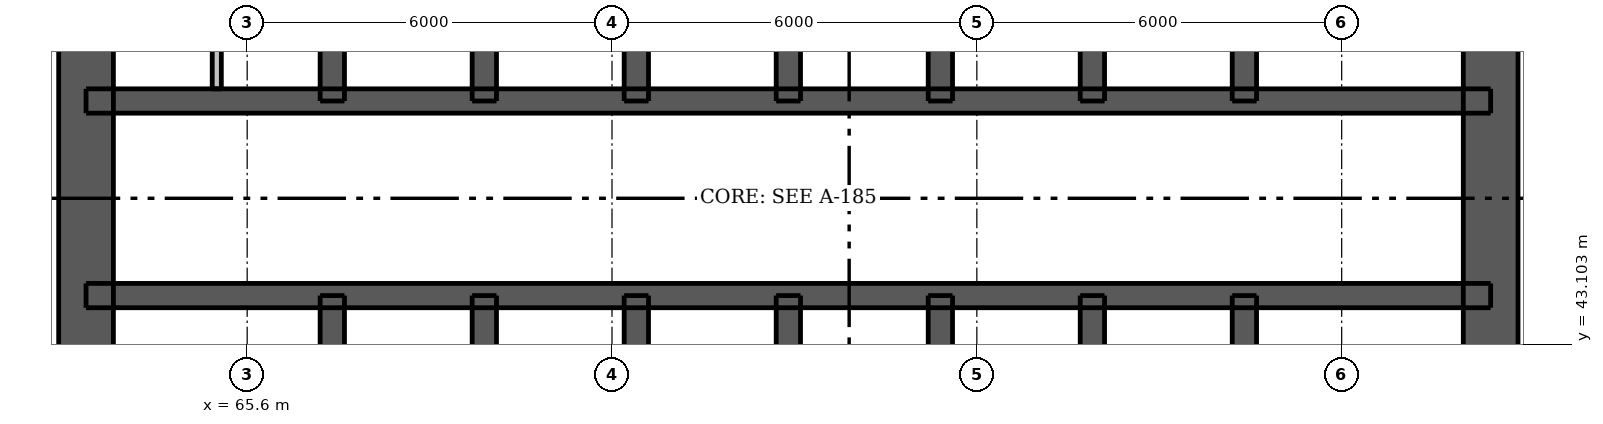
"""IFC4 building model, lengths in metres.
Left out: names, types, materials, properties, quantities, classifications, styles, units other than length and angle.
Written with IfcOpenShell. Run it as: python <this file> out.ifc"""

import sys

from ifc_helpers import new_model, si_unit, direction, frame, frame_2d, origin, place, context, subcontext, project, spatial, rectangle, extrude, element, fill, save


model = new_model("IFC4")
c1 = context("Model", 3, precision=1e-05, world=origin(), true_north=direction((0.0, 1.0)))
c2 = subcontext(c1, "Body", "Model", "MODEL_VIEW")
j1 = project(units=[si_unit("LENGTHUNIT", "METRE"), si_unit("PLANEANGLEUNIT", "RADIAN")], contexts=[c1])
p1 = place(None, origin())
s1 = spatial("IfcSite", under=j1, at=p1, CompositionType="ELEMENT")
p2 = place(p1, origin())
s2 = spatial("IfcBuilding", under=s1, at=p2, CompositionType="ELEMENT")
p3 = place(p2, frame((0.0, 0.0, 26.8)))
s3 = spatial("IfcBuildingStorey", under=s2, at=p3, CompositionType="ELEMENT", Elevation=26.8)
p4 = place(p3, frame((62.95, 33.5, 0.0), z_axis=(0.0, 0.0, 1.0), x_axis=(0.0, 1.0, 0.0)))
e1 = element("IfcWall", 1, at=p4, inside=s3, PredefinedType="SHEAR", context=c2, shape_type="SweptSolid", body=[
    extrude(rectangle(XDim=24.0, YDim=0.9, at=frame_2d((12.0, 0.0))), origin(), (0.0, 0.0, 1.0), 3.05),
])
p5 = place(p4, frame((11.2, 0.0, 0.0)))
e2 = element("IfcOpeningElement", 2, at=p5, cuts=e1, PredefinedType="OPENING", context=c2, shape_type="SweptSolid", body=[
    extrude(rectangle(XDim=1.6, YDim=2.1, at=frame_2d((0.8, 1.05))), frame((0.0, 0.46, 0.0), z_axis=(0.0, -1.0, 0.0), x_axis=(1.0, 0.0, 0.0)), (0.0, 0.0, 1.0), 0.92),
])
p6 = place(p3, frame((86.05, 33.5, 0.0), z_axis=(0.0, 0.0, 1.0), x_axis=(0.0, 1.0, 0.0)))
e3 = element("IfcWall", 3, at=p6, inside=s3, PredefinedType="SHEAR", context=c2, shape_type="SweptSolid", body=[
    extrude(rectangle(XDim=24.0, YDim=0.9, at=frame_2d((12.0, 0.0))), origin(), (0.0, 0.0, 1.0), 3.05),
])
p7 = place(p6, frame((11.2, 0.0, 0.0)))
e4 = element("IfcOpeningElement", 4, at=p7, cuts=e3, PredefinedType="OPENING", context=c2, shape_type="SweptSolid", body=[
    extrude(rectangle(XDim=1.6, YDim=2.1, at=frame_2d((0.8, 1.05))), frame((0.0, 0.46, 0.0), z_axis=(0.0, -1.0, 0.0), x_axis=(1.0, 0.0, 0.0)), (0.0, 0.0, 1.0), 0.92),
])
p8 = place(p3, frame((62.95, 43.9, 0.0), z_axis=(0.0, 0.0, 1.0), x_axis=(1.0, 0.0, 0.0)))
e5 = element("IfcWall", 5, at=p8, inside=s3, PredefinedType="SHEAR", context=c2, shape_type="SweptSolid", body=[
    extrude(rectangle(XDim=23.1, YDim=0.4, at=frame_2d((11.55, 0.0))), origin(), (0.0, 0.0, 1.0), 3.05),
])
p9 = place(p8, frame((1.7, 0.0, 0.0)))
e6 = element("IfcOpeningElement", 6, at=p9, cuts=e5, PredefinedType="OPENING", context=c2, shape_type="SweptSolid", body=[
    extrude(rectangle(XDim=0.9, YDim=2.1, at=frame_2d((0.45, 1.05))), frame((0.0, 0.21, 0.0), z_axis=(0.0, -1.0, 0.0), x_axis=(1.0, 0.0, 0.0)), (0.0, 0.0, 1.0), 0.42),
])
p10 = place(p8, frame((20.5, 0.0, 0.0)))
e7 = element("IfcOpeningElement", 7, at=p10, cuts=e5, PredefinedType="OPENING", context=c2, shape_type="SweptSolid", body=[
    extrude(rectangle(XDim=0.9, YDim=2.1, at=frame_2d((0.45, 1.05))), frame((0.0, 0.21, 0.0), z_axis=(0.0, -1.0, 0.0), x_axis=(1.0, 0.0, 0.0)), (0.0, 0.0, 1.0), 0.42),
])
p11 = place(p8, frame((4.75, 0.0, 0.0)))
e8 = element("IfcOpeningElement", 8, at=p11, cuts=e5, PredefinedType="OPENING", context=c2, shape_type="SweptSolid", body=[
    extrude(rectangle(XDim=1.1, YDim=2.1, at=frame_2d((0.55, 1.05))), frame((0.0, 0.21, 0.0), z_axis=(0.0, -1.0, 0.0), x_axis=(1.0, 0.0, 0.0)), (0.0, 0.0, 1.0), 0.42),
])
p12 = place(p8, frame((7.25, 0.0, 0.0)))
e9 = element("IfcOpeningElement", 9, at=p12, cuts=e5, PredefinedType="OPENING", context=c2, shape_type="SweptSolid", body=[
    extrude(rectangle(XDim=1.1, YDim=2.1, at=frame_2d((0.55, 1.05))), frame((0.0, 0.21, 0.0), z_axis=(0.0, -1.0, 0.0), x_axis=(1.0, 0.0, 0.0)), (0.0, 0.0, 1.0), 0.42),
])
p13 = place(p8, frame((9.75, 0.0, 0.0)))
e10 = element("IfcOpeningElement", 10, at=p13, cuts=e5, PredefinedType="OPENING", context=c2, shape_type="SweptSolid", body=[
    extrude(rectangle(XDim=1.1, YDim=2.1, at=frame_2d((0.55, 1.05))), frame((0.0, 0.21, 0.0), z_axis=(0.0, -1.0, 0.0), x_axis=(1.0, 0.0, 0.0)), (0.0, 0.0, 1.0), 0.42),
])
p14 = place(p8, frame((12.25, 0.0, 0.0)))
e11 = element("IfcOpeningElement", 11, at=p14, cuts=e5, PredefinedType="OPENING", context=c2, shape_type="SweptSolid", body=[
    extrude(rectangle(XDim=1.1, YDim=2.1, at=frame_2d((0.55, 1.05))), frame((0.0, 0.21, 0.0), z_axis=(0.0, -1.0, 0.0), x_axis=(1.0, 0.0, 0.0)), (0.0, 0.0, 1.0), 0.42),
])
p15 = place(p8, frame((14.75, 0.0, 0.0)))
e12 = element("IfcOpeningElement", 12, at=p15, cuts=e5, PredefinedType="OPENING", context=c2, shape_type="SweptSolid", body=[
    extrude(rectangle(XDim=1.1, YDim=2.1, at=frame_2d((0.55, 1.05))), frame((0.0, 0.21, 0.0), z_axis=(0.0, -1.0, 0.0), x_axis=(1.0, 0.0, 0.0)), (0.0, 0.0, 1.0), 0.42),
])
p16 = place(p8, frame((17.25, 0.0, 0.0)))
e13 = element("IfcOpeningElement", 13, at=p16, cuts=e5, PredefinedType="OPENING", context=c2, shape_type="SweptSolid", body=[
    extrude(rectangle(XDim=1.1, YDim=2.1, at=frame_2d((0.55, 1.05))), frame((0.0, 0.21, 0.0), z_axis=(0.0, -1.0, 0.0), x_axis=(1.0, 0.0, 0.0)), (0.0, 0.0, 1.0), 0.42),
])
p17 = place(p3, frame((62.95, 47.1, 0.0), z_axis=(0.0, 0.0, 1.0), x_axis=(1.0, 0.0, 0.0)))
e14 = element("IfcWall", 14, at=p17, inside=s3, PredefinedType="SHEAR", context=c2, shape_type="SweptSolid", body=[
    extrude(rectangle(XDim=23.1, YDim=0.4, at=frame_2d((11.55, 0.0))), origin(), (0.0, 0.0, 1.0), 3.05),
])
p18 = place(p17, frame((0.85, 0.0, 0.0)))
e15 = element("IfcOpeningElement", 15, at=p18, cuts=e14, PredefinedType="OPENING", context=c2, shape_type="SweptSolid", body=[
    extrude(rectangle(XDim=0.9, YDim=2.1, at=frame_2d((0.45, 1.05))), frame((0.0, 0.21, 0.0), z_axis=(0.0, -1.0, 0.0), x_axis=(1.0, 0.0, 0.0)), (0.0, 0.0, 1.0), 0.42),
])
p19 = place(p17, frame((2.55, 0.0, 0.0)))
e16 = element("IfcOpeningElement", 16, at=p19, cuts=e14, PredefinedType="OPENING", context=c2, shape_type="SweptSolid", body=[
    extrude(rectangle(XDim=0.9, YDim=2.1, at=frame_2d((0.45, 1.05))), frame((0.0, 0.21, 0.0), z_axis=(0.0, -1.0, 0.0), x_axis=(1.0, 0.0, 0.0)), (0.0, 0.0, 1.0), 0.42),
])
p20 = place(p17, frame((20.5, 0.0, 0.0)))
e17 = element("IfcOpeningElement", 17, at=p20, cuts=e14, PredefinedType="OPENING", context=c2, shape_type="SweptSolid", body=[
    extrude(rectangle(XDim=0.9, YDim=2.1, at=frame_2d((0.45, 1.05))), frame((0.0, 0.21, 0.0), z_axis=(0.0, -1.0, 0.0), x_axis=(1.0, 0.0, 0.0)), (0.0, 0.0, 1.0), 0.42),
])
p21 = place(p3, frame((67.0, 33.95, 0.0), z_axis=(0.0, 0.0, 1.0), x_axis=(0.0, 1.0, 0.0)))
e18 = element("IfcWall", 18, at=p21, inside=s3, PredefinedType="SHEAR", context=c2, shape_type="SweptSolid", body=[
    extrude(rectangle(XDim=9.95, YDim=0.4, at=frame_2d((4.975, 0.0))), origin(), (0.0, 0.0, 1.0), 3.05),
])
p22 = place(p21, frame((0.65, 0.0, 0.0)))
e19 = element("IfcOpeningElement", 19, at=p22, cuts=e18, PredefinedType="OPENING", context=c2, shape_type="SweptSolid", body=[
    extrude(rectangle(XDim=1.1, YDim=2.1, at=frame_2d((0.55, 1.05))), frame((0.0, 0.21, 0.0), z_axis=(0.0, -1.0, 0.0), x_axis=(1.0, 0.0, 0.0)), (0.0, 0.0, 1.0), 0.42),
])
for number, where, z_axis, x_axis in (
    (20, (67.0, 47.1, 0.0), (0.0, 0.0, 1.0), (0.0, 1.0, 0.0)),
    (21, (82.0, 33.95, 0.0), (0.0, 0.0, 1.0), (0.0, 1.0, 0.0)),
    (22, (82.0, 47.1, 0.0), (0.0, 0.0, 1.0), (0.0, 1.0, 0.0)),
):
    element("IfcWall", number, at=place(p3, frame(where, z_axis=z_axis, x_axis=x_axis)), inside=s3, PredefinedType="SHEAR", context=c2, shape_type="SweptSolid", body=[
        extrude(rectangle(XDim=9.95, YDim=0.4, at=frame_2d((4.975, 0.0))), origin(), (0.0, 0.0, 1.0), 3.05),
    ])
for number, where, z_axis, x_axis in (
    (23, (69.5, 41.0, 0.0), (0.0, 0.0, 1.0), (0.0, 1.0, 0.0)),
    (24, (69.5, 47.1, 0.0), (0.0, 0.0, 1.0), (0.0, 1.0, 0.0)),
    (25, (72.0, 41.0, 0.0), (0.0, 0.0, 1.0), (0.0, 1.0, 0.0)),
    (26, (72.0, 47.1, 0.0), (0.0, 0.0, 1.0), (0.0, 1.0, 0.0)),
    (27, (74.5, 41.0, 0.0), (0.0, 0.0, 1.0), (0.0, 1.0, 0.0)),
    (28, (74.5, 47.1, 0.0), (0.0, 0.0, 1.0), (0.0, 1.0, 0.0)),
    (29, (77.0, 41.0, 0.0), (0.0, 0.0, 1.0), (0.0, 1.0, 0.0)),
    (30, (77.0, 47.1, 0.0), (0.0, 0.0, 1.0), (0.0, 1.0, 0.0)),
    (31, (79.5, 41.0, 0.0), (0.0, 0.0, 1.0), (0.0, 1.0, 0.0)),
    (32, (79.5, 47.1, 0.0), (0.0, 0.0, 1.0), (0.0, 1.0, 0.0)),
):
    element("IfcWall", number, at=place(p3, frame(where, z_axis=z_axis, x_axis=x_axis)), inside=s3, PredefinedType="SHEAR", context=c2, shape_type="SweptSolid", body=[
        extrude(rectangle(XDim=2.9, YDim=0.4, at=frame_2d((1.45, 0.0))), origin(), (0.0, 0.0, 1.0), 3.05),
    ])
p23 = place(p3, frame((65.1, 47.3, 0.0), z_axis=(0.0, 0.0, 1.0), x_axis=(0.0, 1.0, 0.0)))
e33 = element("IfcWall", 33, at=p23, inside=s3, PredefinedType="PLUMBINGWALL", context=c2, shape_type="SweptSolid", body=[
    extrude(rectangle(XDim=2.5, YDim=0.15, at=frame_2d((1.25, 0.0))), origin(), (0.0, 0.0, 1.0), 3.05),
])
p24 = place(p5, origin())
e34 = element("IfcDoor", 34, at=p24, inside=s3, OperationType="DOUBLE_DOOR_SINGLE_SWING", PredefinedType="DOOR", context=c2, shape_type="SweptSolid", body=[
    extrude(rectangle(XDim=1.6, YDim=2.1, at=frame_2d((0.8, 1.05))), frame((0.0, -0.388, 0.0), z_axis=(0.0, -1.0, 0.0), x_axis=(1.0, 0.0, 0.0)), (0.0, 0.0, 1.0), 0.05),
])
fill(e2, e34)
p25 = place(p7, origin())
e35 = element("IfcDoor", 35, at=p25, inside=s3, OperationType="DOUBLE_DOOR_SINGLE_SWING", PredefinedType="DOOR", context=c2, shape_type="SweptSolid", body=[
    extrude(rectangle(XDim=1.6, YDim=2.1, at=frame_2d((0.8, 1.05))), frame((0.0, 0.438, 0.0), z_axis=(0.0, -1.0, 0.0), x_axis=(1.0, 0.0, 0.0)), (0.0, 0.0, 1.0), 0.05),
])
fill(e4, e35)
p26 = place(p9, origin())
e36 = element("IfcDoor", 36, at=p26, inside=s3, OperationType="SINGLE_SWING_LEFT", PredefinedType="DOOR", context=c2, shape_type="SweptSolid", body=[
    extrude(rectangle(XDim=0.9, YDim=2.1, at=frame_2d((0.45, 1.05))), frame((0.0, -0.138, 0.0), z_axis=(0.0, -1.0, 0.0), x_axis=(1.0, 0.0, 0.0)), (0.0, 0.0, 1.0), 0.05),
])
fill(e6, e36)
p27 = place(p10, origin())
e37 = element("IfcDoor", 37, at=p27, inside=s3, OperationType="SINGLE_SWING_LEFT", PredefinedType="DOOR", context=c2, shape_type="SweptSolid", body=[
    extrude(rectangle(XDim=0.9, YDim=2.1, at=frame_2d((0.45, 1.05))), frame((0.0, -0.138, 0.0), z_axis=(0.0, -1.0, 0.0), x_axis=(1.0, 0.0, 0.0)), (0.0, 0.0, 1.0), 0.05),
])
fill(e7, e37)
p28 = place(p18, origin())
e38 = element("IfcDoor", 38, at=p28, inside=s3, OperationType="SINGLE_SWING_LEFT", PredefinedType="DOOR", context=c2, shape_type="SweptSolid", body=[
    extrude(rectangle(XDim=0.9, YDim=2.1, at=frame_2d((0.45, 1.05))), frame((0.0, 0.188, 0.0), z_axis=(0.0, -1.0, 0.0), x_axis=(1.0, 0.0, 0.0)), (0.0, 0.0, 1.0), 0.05),
])
fill(e15, e38)
p29 = place(p19, origin())
e39 = element("IfcDoor", 39, at=p29, inside=s3, OperationType="SINGLE_SWING_RIGHT", PredefinedType="DOOR", context=c2, shape_type="SweptSolid", body=[
    extrude(rectangle(XDim=0.9, YDim=2.1, at=frame_2d((0.45, 1.05))), frame((0.0, 0.188, 0.0), z_axis=(0.0, -1.0, 0.0), x_axis=(1.0, 0.0, 0.0)), (0.0, 0.0, 1.0), 0.05),
])
fill(e16, e39)
p30 = place(p20, origin())
e40 = element("IfcDoor", 40, at=p30, inside=s3, OperationType="SINGLE_SWING_LEFT", PredefinedType="DOOR", context=c2, shape_type="SweptSolid", body=[
    extrude(rectangle(XDim=0.9, YDim=2.1, at=frame_2d((0.45, 1.05))), frame((0.0, 0.188, 0.0), z_axis=(0.0, -1.0, 0.0), x_axis=(1.0, 0.0, 0.0)), (0.0, 0.0, 1.0), 0.05),
])
fill(e17, e40)
p31 = place(p11, origin())
e41 = element("IfcDoor", 41, at=p31, inside=s3, OperationType="DOUBLE_DOOR_SLIDING", PredefinedType="DOOR", context=c2, shape_type="SweptSolid", body=[
    extrude(rectangle(XDim=1.1, YDim=2.1, at=frame_2d((0.55, 1.05))), frame((0.0, 0.025, 0.0), z_axis=(0.0, -1.0, 0.0), x_axis=(1.0, 0.0, 0.0)), (0.0, 0.0, 1.0), 0.05),
])
fill(e8, e41)
p32 = place(p12, origin())
e42 = element("IfcDoor", 42, at=p32, inside=s3, OperationType="DOUBLE_DOOR_SLIDING", PredefinedType="DOOR", context=c2, shape_type="SweptSolid", body=[
    extrude(rectangle(XDim=1.1, YDim=2.1, at=frame_2d((0.55, 1.05))), frame((0.0, 0.025, 0.0), z_axis=(0.0, -1.0, 0.0), x_axis=(1.0, 0.0, 0.0)), (0.0, 0.0, 1.0), 0.05),
])
fill(e9, e42)
p33 = place(p13, origin())
e43 = element("IfcDoor", 43, at=p33, inside=s3, OperationType="DOUBLE_DOOR_SLIDING", PredefinedType="DOOR", context=c2, shape_type="SweptSolid", body=[
    extrude(rectangle(XDim=1.1, YDim=2.1, at=frame_2d((0.55, 1.05))), frame((0.0, 0.025, 0.0), z_axis=(0.0, -1.0, 0.0), x_axis=(1.0, 0.0, 0.0)), (0.0, 0.0, 1.0), 0.05),
])
fill(e10, e43)
p34 = place(p14, origin())
e44 = element("IfcDoor", 44, at=p34, inside=s3, OperationType="DOUBLE_DOOR_SLIDING", PredefinedType="DOOR", context=c2, shape_type="SweptSolid", body=[
    extrude(rectangle(XDim=1.1, YDim=2.1, at=frame_2d((0.55, 1.05))), frame((0.0, 0.025, 0.0), z_axis=(0.0, -1.0, 0.0), x_axis=(1.0, 0.0, 0.0)), (0.0, 0.0, 1.0), 0.05),
])
fill(e11, e44)
p35 = place(p15, origin())
e45 = element("IfcDoor", 45, at=p35, inside=s3, OperationType="DOUBLE_DOOR_SLIDING", PredefinedType="DOOR", context=c2, shape_type="SweptSolid", body=[
    extrude(rectangle(XDim=1.1, YDim=2.1, at=frame_2d((0.55, 1.05))), frame((0.0, 0.025, 0.0), z_axis=(0.0, -1.0, 0.0), x_axis=(1.0, 0.0, 0.0)), (0.0, 0.0, 1.0), 0.05),
])
fill(e12, e45)
p36 = place(p16, origin())
e46 = element("IfcDoor", 46, at=p36, inside=s3, OperationType="DOUBLE_DOOR_SLIDING", PredefinedType="DOOR", context=c2, shape_type="SweptSolid", body=[
    extrude(rectangle(XDim=1.1, YDim=2.1, at=frame_2d((0.55, 1.05))), frame((0.0, 0.025, 0.0), z_axis=(0.0, -1.0, 0.0), x_axis=(1.0, 0.0, 0.0)), (0.0, 0.0, 1.0), 0.05),
])
fill(e13, e46)
save(model, sys.argv[1])
